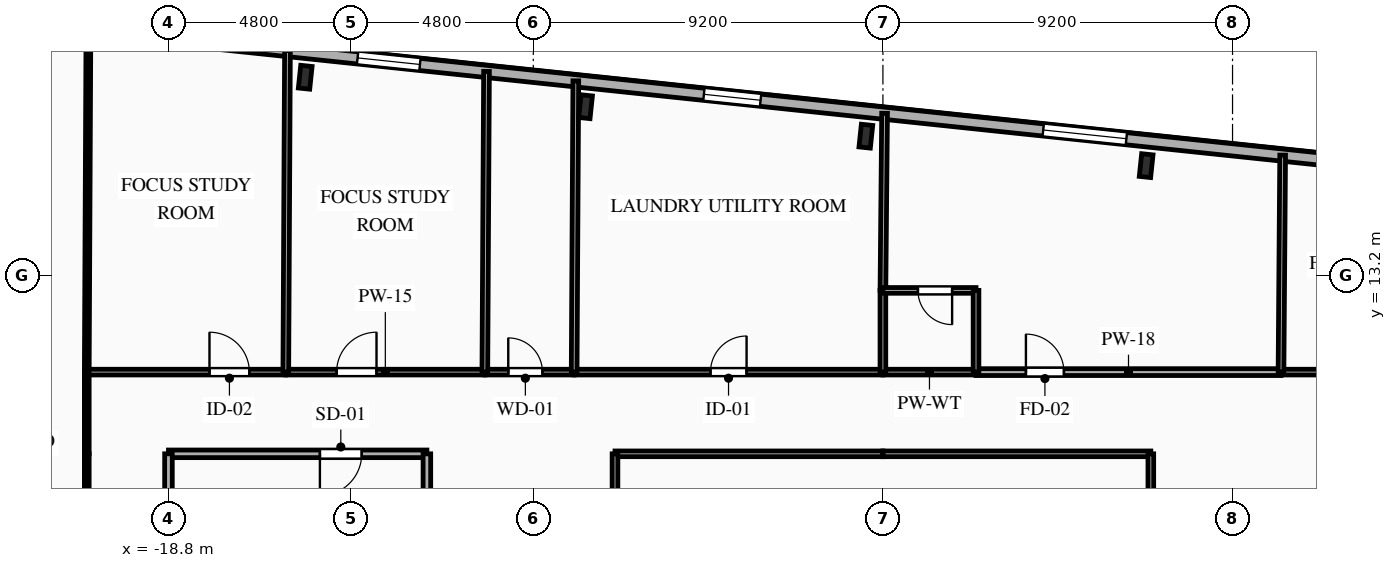
"""IFC4 building model, lengths in metres.
Left out: names, types, materials, properties, quantities, classifications, styles, units other than length and angle.
Written with IfcOpenShell. Run it as: python <this file> out.ifc"""

import sys

from ifc_helpers import new_model, si_unit, direction, frame, frame_2d, origin, origin_2d, place, context, subcontext, project, spatial, rectangle, i_section, extrude, element, fill, save


model = new_model("IFC4")
c1 = context("Model", 3, precision=1e-05, world=origin(), true_north=direction((0.0, 1.0)))
c2 = subcontext(c1, "Body", "Model", "MODEL_VIEW")
j1 = project(units=[si_unit("LENGTHUNIT", "METRE"), si_unit("PLANEANGLEUNIT", "RADIAN")], contexts=[c1])
p1 = place(None, origin())
s1 = spatial("IfcSite", under=j1, at=p1, CompositionType="ELEMENT")
p2 = place(p1, origin())
s2 = spatial("IfcBuilding", under=s1, at=p2, CompositionType="ELEMENT")
p3 = place(p2, frame((0.0, 0.0, 199.75)))
s3 = spatial("IfcBuildingStorey", under=s2, at=p3, CompositionType="ELEMENT", Elevation=199.75)
for number, where, z_axis, x_axis in (
    (1, (6.927, 16.083, 0.0), (0.0, 0.0, 1.0), (0.995, -0.105, 0.0)),
    (2, (-0.449, 16.858, 0.0), (0.0, 0.0, 1.0), (0.995, -0.105, 0.0)),
    (3, (-7.825, 17.634, 0.0), (0.0, 0.0, 1.0), (0.995, -0.105, 0.0)),
    (4, (-15.201, 18.409, 0.0), (0.0, 0.0, 1.0), (0.995, -0.105, 0.0)),
):
    element("IfcColumn", number, at=place(p3, frame(where, z_axis=z_axis, x_axis=x_axis)), inside=s3, PredefinedType="COLUMN", context=c2, shape_type="SweptSolid", body=[
        extrude(i_section(OverallWidth=0.3, OverallDepth=0.6, WebThickness=0.015, FlangeThickness=0.03, FilletRadius=0.027, at=origin_2d()), origin(), (0.0, 0.0, 1.0), 3.35),
    ])
p4 = place(p3, frame((-23.156, 19.898, 0.0), z_axis=(0.0, 0.0, 1.0), x_axis=(0.994522001802, -0.104527450613, 0.0)))
e5 = element("IfcWall", 5, at=p4, inside=s3, PredefinedType="SOLIDWALL", context=c2, shape_type="SweptSolid", body=[
    extrude(rectangle(XDim=45.8, YDim=0.32, at=frame_2d((22.9, 0.0))), origin(), (0.0, 0.0, 1.0), 3.04),
])
p5 = place(p4, frame((4.139, 0.0, 0.85)))
e6 = element("IfcOpeningElement", 6, at=p5, cuts=e5, PredefinedType="OPENING", context=c2, shape_type="SweptSolid", body=[
    extrude(rectangle(XDim=1.65, YDim=1.85, at=frame_2d((0.825, 0.925))), frame((0.0, 0.17, 0.0), z_axis=(0.0, -1.0, 0.0), x_axis=(1.0, 0.0, 0.0)), (0.0, 0.0, 1.0), 0.34),
])
p6 = place(p4, frame((9.384, 0.0, 0.85)))
e7 = element("IfcOpeningElement", 7, at=p6, cuts=e5, PredefinedType="OPENING", context=c2, shape_type="SweptSolid", body=[
    extrude(rectangle(XDim=1.65, YDim=1.85, at=frame_2d((0.825, 0.925))), frame((0.0, 0.17, 0.0), z_axis=(0.0, -1.0, 0.0), x_axis=(1.0, 0.0, 0.0)), (0.0, 0.0, 1.0), 0.34),
])
p7 = place(p4, frame((18.547, 0.0, 0.85)))
e8 = element("IfcOpeningElement", 8, at=p7, cuts=e5, PredefinedType="OPENING", context=c2, shape_type="SweptSolid", body=[
    extrude(rectangle(XDim=1.5, YDim=1.85, at=frame_2d((0.75, 0.925))), frame((0.0, 0.17, 0.0), z_axis=(0.0, -1.0, 0.0), x_axis=(1.0, 0.0, 0.0)), (0.0, 0.0, 1.0), 0.34),
])
p8 = place(p4, frame((27.525, 0.0, 0.85)))
e9 = element("IfcOpeningElement", 9, at=p8, cuts=e5, PredefinedType="OPENING", context=c2, shape_type="SweptSolid", body=[
    extrude(rectangle(XDim=2.2, YDim=1.85, at=frame_2d((1.1, 0.925))), frame((0.0, 0.17, 0.0), z_axis=(0.0, -1.0, 0.0), x_axis=(1.0, 0.0, 0.0)), (0.0, 0.0, 1.0), 0.34),
])
p9 = place(p4, frame((38.329, 0.0, 0.85)))
e10 = element("IfcOpeningElement", 10, at=p9, cuts=e5, PredefinedType="OPENING", context=c2, shape_type="SweptSolid", body=[
    extrude(rectangle(XDim=1.65, YDim=1.85, at=frame_2d((0.825, 0.925))), frame((0.0, 0.17, 0.0), z_axis=(0.0, -1.0, 0.0), x_axis=(1.0, 0.0, 0.0)), (0.0, 0.0, 1.0), 0.34),
])
p10 = place(p3, frame((-12.0, 8.5, 0.0), z_axis=(0.0, 0.0, 1.0), x_axis=(-1.0, 0.0, 0.0)))
e11 = element("IfcWall", 11, at=p10, inside=s3, PredefinedType="PARTITIONING", context=c2, shape_type="SweptSolid", body=[
    extrude(rectangle(XDim=6.8, YDim=0.2, at=frame_2d((3.4, 0.0))), origin(), (0.0, 0.0, 1.0), 3.04),
])
p11 = place(p10, frame((1.715, 0.0, 0.0)))
e12 = element("IfcOpeningElement", 12, at=p11, cuts=e11, PredefinedType="OPENING", context=c2, shape_type="SweptSolid", body=[
    extrude(rectangle(XDim=1.1, YDim=2.15, at=frame_2d((0.55, 1.075))), frame((0.0, 0.11, 0.0), z_axis=(0.0, -1.0, 0.0), x_axis=(1.0, 0.0, 0.0)), (0.0, 0.0, 1.0), 0.22),
])
p12 = place(p3, frame((-18.8, 8.5, 0.0), z_axis=(0.0, 0.0, 1.0), x_axis=(0.0, -1.0, 0.0)))
e13 = element("IfcWall", 13, at=p12, inside=s3, PredefinedType="PARTITIONING", context=c2, shape_type="SweptSolid", body=[
    extrude(rectangle(XDim=2.9, YDim=0.2, at=frame_2d((1.45, 0.0))), origin(), (0.0, 0.0, 1.0), 2.665),
])
p13 = place(p3, frame((-12.0, 5.6, 0.0), z_axis=(0.0, 0.0, 1.0), x_axis=(0.0, 1.0, 0.0)))
e14 = element("IfcWall", 14, at=p13, inside=s3, PredefinedType="PARTITIONING", context=c2, shape_type="SweptSolid", body=[
    extrude(rectangle(XDim=2.9, YDim=0.2, at=frame_2d((1.45, 0.0))), origin(), (0.0, 0.0, 1.0), 3.04),
])
p14 = place(p3, frame((-20.95, 8.5, 0.0), z_axis=(0.0, 0.0, 1.0), x_axis=(0.0, 1.0, 0.0)))
e15 = element("IfcWall", 15, at=p14, inside=s3, PredefinedType="PARTITIONING", context=c2, shape_type="SweptSolid", body=[
    extrude(rectangle(XDim=2.15, YDim=0.125, at=frame_2d((1.075, 0.0))), origin(), (0.0, 0.0, 1.0), 3.04),
])
p15 = place(p3, frame((-20.95, 10.65, 0.0), z_axis=(0.0, 0.0, 1.0), x_axis=(1.0, 0.0, 0.0)))
e16 = element("IfcWall", 16, at=p15, inside=s3, PredefinedType="PARTITIONING", context=c2, shape_type="SweptSolid", body=[
    extrude(rectangle(XDim=5.238, YDim=0.15, at=frame_2d((2.619, 0.0))), origin(), (0.0, 0.0, 1.0), 3.04),
])
p16 = place(p15, frame((3.229, 0.0, 0.0)))
e17 = element("IfcOpeningElement", 17, at=p16, cuts=e16, PredefinedType="OPENING", context=c2, shape_type="SweptSolid", body=[
    extrude(rectangle(XDim=1.05, YDim=2.15, at=frame_2d((0.525, 1.075))), frame((0.0, 0.085, 0.0), z_axis=(0.0, -1.0, 0.0), x_axis=(1.0, 0.0, 0.0)), (0.0, 0.0, 1.0), 0.17),
])
p17 = place(p3, frame((-15.712, 10.65, 0.0), z_axis=(0.0, 0.0, 1.0), x_axis=(1.0, 0.0, 0.0)))
e18 = element("IfcWall", 18, at=p17, inside=s3, PredefinedType="PARTITIONING", context=c2, shape_type="SweptSolid", body=[
    extrude(rectangle(XDim=5.237, YDim=0.15, at=frame_2d((2.619, 0.0))), origin(), (0.0, 0.0, 1.0), 3.04),
])
p18 = place(p17, frame((1.337, 0.0, 0.0)))
e19 = element("IfcOpeningElement", 19, at=p18, cuts=e18, PredefinedType="OPENING", context=c2, shape_type="SweptSolid", body=[
    extrude(rectangle(XDim=1.05, YDim=2.15, at=frame_2d((0.525, 1.075))), frame((0.0, 0.085, 0.0), z_axis=(0.0, -1.0, 0.0), x_axis=(1.0, 0.0, 0.0)), (0.0, 0.0, 1.0), 0.17),
])
p19 = place(p3, frame((-10.475, 10.65, 0.0), z_axis=(0.0, 0.0, 1.0), x_axis=(1.0, 0.0, 0.0)))
e20 = element("IfcWall", 20, at=p19, inside=s3, PredefinedType="PLUMBINGWALL", context=c2, shape_type="SweptSolid", body=[
    extrude(rectangle(XDim=2.35, YDim=0.15, at=frame_2d((1.175, 0.0))), origin(), (0.0, 0.0, 1.0), 3.04),
])
p20 = place(p19, frame((0.616, 0.0, 0.0)))
e21 = element("IfcOpeningElement", 21, at=p20, cuts=e20, PredefinedType="OPENING", context=c2, shape_type="SweptSolid", body=[
    extrude(rectangle(XDim=0.9, YDim=2.1, at=frame_2d((0.45, 1.05))), frame((0.0, 0.085, 0.0), z_axis=(0.0, -1.0, 0.0), x_axis=(1.0, 0.0, 0.0)), (0.0, 0.0, 1.0), 0.17),
])
p21 = place(p3, frame((-8.125, 10.65, 0.0), z_axis=(0.0, 0.0, 1.0), x_axis=(1.0, 0.0, 0.0)))
e22 = element("IfcWall", 22, at=p21, inside=s3, PredefinedType="PARTITIONING", context=c2, shape_type="SweptSolid", body=[
    extrude(rectangle(XDim=8.125, YDim=0.15, at=frame_2d((4.062, 0.0))), origin(), (0.0, 0.0, 1.0), 3.04),
])
p22 = place(p21, frame((3.587, 0.0, 0.0)))
e23 = element("IfcOpeningElement", 23, at=p22, cuts=e22, PredefinedType="OPENING", context=c2, shape_type="SweptSolid", body=[
    extrude(rectangle(XDim=0.95, YDim=2.1, at=frame_2d((0.475, 1.05))), frame((0.0, 0.085, 0.0), z_axis=(0.0, -1.0, 0.0), x_axis=(1.0, 0.0, 0.0)), (0.0, 0.0, 1.0), 0.17),
])
p23 = place(p3, frame((0.0, 8.5, 0.0), z_axis=(0.0, 0.0, 1.0), x_axis=(-1.0, 0.0, 0.0)))
e24 = element("IfcWall", 24, at=p23, inside=s3, PredefinedType="PARTITIONING", context=c2, shape_type="SweptSolid", body=[
    extrude(rectangle(XDim=7.05, YDim=0.15, at=frame_2d((3.525, 0.0))), origin(), (0.0, 0.0, 1.0), 3.04),
])
p24 = place(p3, frame((2.45, 10.65, 0.0), z_axis=(0.0, 0.0, 1.0), x_axis=(1.0, 0.0, 0.0)))
e25 = element("IfcWall", 25, at=p24, inside=s3, PredefinedType="PARTITIONING", context=c2, shape_type="SweptSolid", body=[
    extrude(rectangle(XDim=8.025, YDim=0.18, at=frame_2d((4.013, 0.0))), origin(), (0.0, 0.0, 1.0), 3.04),
])
p25 = place(p24, frame((1.313, 0.0, 0.0)))
e26 = element("IfcOpeningElement", 26, at=p25, cuts=e25, PredefinedType="OPENING", context=c2, shape_type="SweptSolid", body=[
    extrude(rectangle(XDim=1.0, YDim=2.15, at=frame_2d((0.5, 1.075))), frame((0.0, 0.1, 0.0), z_axis=(0.0, -1.0, 0.0), x_axis=(1.0, 0.0, 0.0)), (0.0, 0.0, 1.0), 0.2),
])
p26 = place(p3, frame((0.0, 10.65, 0.0), z_axis=(0.0, 0.0, 1.0), x_axis=(1.0, 0.0, 0.0)))
e27 = element("IfcWall", 27, at=p26, inside=s3, PredefinedType="PLUMBINGWALL", context=c2, shape_type="SweptSolid", body=[
    extrude(rectangle(XDim=2.45, YDim=0.15, at=frame_2d((1.225, 0.0))), origin(), (0.0, 0.0, 1.0), 3.04),
])
p27 = place(p3, frame((10.475, 10.65, 0.0), z_axis=(0.0, 0.0, 1.0), x_axis=(1.0, 0.0, 0.0)))
e28 = element("IfcWall", 28, at=p27, inside=s3, PredefinedType="PARTITIONING", context=c2, shape_type="SweptSolid", body=[
    extrude(rectangle(XDim=10.475, YDim=0.15, at=frame_2d((5.237, 0.0))), origin(), (0.0, 0.0, 1.0), 3.04),
])
p28 = place(p27, frame((5.746, 0.0, 0.0)))
e29 = element("IfcOpeningElement", 29, at=p28, cuts=e28, PredefinedType="OPENING", context=c2, shape_type="SweptSolid", body=[
    extrude(rectangle(XDim=1.05, YDim=2.15, at=frame_2d((0.525, 1.075))), frame((0.0, 0.085, 0.0), z_axis=(0.0, -1.0, 0.0), x_axis=(1.0, 0.0, 0.0)), (0.0, 0.0, 1.0), 0.17),
])
p29 = place(p3, frame((7.05, 8.5, 0.0), z_axis=(0.0, 0.0, 1.0), x_axis=(-1.0, 0.0, 0.0)))
e30 = element("IfcWall", 30, at=p29, inside=s3, PredefinedType="PARTITIONING", context=c2, shape_type="SweptSolid", body=[
    extrude(rectangle(XDim=7.05, YDim=0.15, at=frame_2d((3.525, 0.0))), origin(), (0.0, 0.0, 1.0), 3.04),
])
p30 = place(p3, frame((-20.95, 2.267, 0.0), z_axis=(0.0, 0.0, 1.0), x_axis=(0.0, 1.0, 0.0)))
e31 = element("IfcWall", 31, at=p30, inside=s3, PredefinedType="PARTITIONING", context=c2, shape_type="SweptSolid", body=[
    extrude(rectangle(XDim=6.233, YDim=0.125, at=frame_2d((3.116, 0.0))), origin(), (0.0, 0.0, 1.0), 3.04),
])
p31 = place(p30, frame((1.095, 0.0, 0.0)))
e32 = element("IfcOpeningElement", 32, at=p31, cuts=e31, PredefinedType="OPENING", context=c2, shape_type="SweptSolid", body=[
    extrude(rectangle(XDim=0.95, YDim=2.1, at=frame_2d((0.475, 1.05))), frame((0.0, 0.073, 0.0), z_axis=(0.0, -1.0, 0.0), x_axis=(1.0, 0.0, 0.0)), (0.0, 0.0, 1.0), 0.145),
])
for number, where, z_axis, x_axis in (
    (33, (-7.05, 8.5, 0.0), (0.0, 0.0, 1.0), (0.0, -1.0, 0.0)),
    (34, (7.05, -0.8, 0.0), (0.0, 0.0, 1.0), (0.0, 1.0, 0.0)),
):
    element("IfcWall", number, at=place(p3, frame(where, z_axis=z_axis, x_axis=x_axis)), inside=s3, PredefinedType="PARTITIONING", context=c2, shape_type="SweptSolid", body=[
        extrude(rectangle(XDim=9.3, YDim=0.15, at=frame_2d((4.65, 0.0))), origin(), (0.0, 0.0, 1.0), 3.04),
    ])
p32 = place(p3, frame((-20.906, 19.662, 0.0), z_axis=(0.0, 0.0, 1.0), x_axis=(-0.004876272857, -0.999988110911, 0.0)))
e35 = element("IfcWall", 35, at=p32, inside=s3, PredefinedType="PARTITIONING", context=c2, shape_type="SweptSolid", body=[
    extrude(rectangle(XDim=9.012, YDim=0.125, at=frame_2d((4.506, 0.0))), origin(), (0.0, 0.0, 1.0), 2.665),
])
p33 = place(p3, frame((-15.669, 19.112, 0.0), z_axis=(0.0, 0.0, 1.0), x_axis=(-0.005164534834, -0.999986663701, 0.0)))
e36 = element("IfcWall", 36, at=p33, inside=s3, PredefinedType="PARTITIONING", context=c2, shape_type="SweptSolid", body=[
    extrude(rectangle(XDim=8.462, YDim=0.15, at=frame_2d((4.231, 0.0))), origin(), (0.0, 0.0, 1.0), 2.665),
])
p34 = place(p3, frame((-10.431, 18.561, 0.0), z_axis=(0.0, 0.0, 1.0), x_axis=(-0.005554784069, -0.999984572068, 0.0)))
e37 = element("IfcWall", 37, at=p34, inside=s3, PredefinedType="PLUMBINGWALL", context=c2, shape_type="SweptSolid", body=[
    extrude(rectangle(XDim=7.911, YDim=0.15, at=frame_2d((3.956, 0.0))), origin(), (0.0, 0.0, 1.0), 3.04),
])
p35 = place(p3, frame((-8.081, 18.314, 0.0), z_axis=(0.0, 0.0, 1.0), x_axis=(-0.005733850696, -0.999983561343, 0.0)))
e38 = element("IfcWall", 38, at=p35, inside=s3, PredefinedType="PLUMBINGWALL", context=c2, shape_type="SweptSolid", body=[
    extrude(rectangle(XDim=7.664, YDim=0.15, at=frame_2d((3.832, 0.0))), origin(), (0.0, 0.0, 1.0), 2.665),
])
p36 = place(p3, frame((0.044, 17.46, 0.0), z_axis=(0.0, 0.0, 1.0), x_axis=(-0.009430083116, -0.999955535778, 0.0)))
e39 = element("IfcWall", 39, at=p36, inside=s3, PredefinedType="PARTITIONING", context=c2, shape_type="SweptSolid", body=[
    extrude(rectangle(XDim=4.66, YDim=0.15, at=frame_2d((2.33, 0.0))), origin(), (0.0, 0.0, 1.0), 3.04),
])
p37 = place(p3, frame((0.0, 12.8, 0.0), z_axis=(0.0, 0.0, 1.0), x_axis=(0.0, -1.0, 0.0)))
e40 = element("IfcWall", 40, at=p37, inside=s3, PredefinedType="PLUMBINGWALL", context=c2, shape_type="SweptSolid", body=[
    extrude(rectangle(XDim=2.15, YDim=0.15, at=frame_2d((1.075, 0.0))), origin(), (0.0, 0.0, 1.0), 3.04),
])
p38 = place(p3, frame((2.45, 12.8, 0.0), z_axis=(0.0, 0.0, 1.0), x_axis=(-1.0, 0.0, 0.0)))
e41 = element("IfcWall", 41, at=p38, inside=s3, PredefinedType="PLUMBINGWALL", context=c2, shape_type="SweptSolid", body=[
    extrude(rectangle(XDim=2.45, YDim=0.15, at=frame_2d((1.225, 0.0))), origin(), (0.0, 0.0, 1.0), 3.04),
])
p39 = place(p38, frame((0.629, 0.0, 0.0)))
e42 = element("IfcOpeningElement", 42, at=p39, cuts=e41, PredefinedType="OPENING", context=c2, shape_type="SweptSolid", body=[
    extrude(rectangle(XDim=0.9, YDim=2.1, at=frame_2d((0.45, 1.05))), frame((0.0, 0.085, 0.0), z_axis=(0.0, -1.0, 0.0), x_axis=(1.0, 0.0, 0.0)), (0.0, 0.0, 1.0), 0.17),
])
p40 = place(p3, frame((2.45, 10.65, 0.0), z_axis=(0.0, 0.0, 1.0), x_axis=(0.0, 1.0, 0.0)))
e43 = element("IfcWall", 43, at=p40, inside=s3, PredefinedType="PLUMBINGWALL", context=c2, shape_type="SweptSolid", body=[
    extrude(rectangle(XDim=2.15, YDim=0.15, at=frame_2d((1.075, 0.0))), origin(), (0.0, 0.0, 1.0), 3.04),
])
p41 = place(p3, frame((10.519, 16.359, 0.0), z_axis=(0.0, 0.0, 1.0), x_axis=(-0.007654255135, -0.99997070576, 0.0)))
e44 = element("IfcWall", 44, at=p41, inside=s3, PredefinedType="PARTITIONING", context=c2, shape_type="SweptSolid", body=[
    extrude(rectangle(XDim=5.709, YDim=0.15, at=frame_2d((2.855, 0.0))), origin(), (0.0, 0.0, 1.0), 3.04),
])
p42 = place(p6, origin())
e45 = element("IfcWindow", 45, at=p42, inside=s3, PartitioningType="SINGLE_PANEL", PredefinedType="WINDOW", context=c2, shape_type="SweptSolid", body=[
    extrude(rectangle(XDim=1.65, YDim=1.85, at=frame_2d((0.825, 0.925))), frame((0.0, 0.03, 0.0), z_axis=(0.0, -1.0, 0.0), x_axis=(1.0, 0.0, 0.0)), (0.0, 0.0, 1.0), 0.06),
])
fill(e7, e45)
p43 = place(p7, origin())
e46 = element("IfcWindow", 46, at=p43, inside=s3, PartitioningType="SINGLE_PANEL", PredefinedType="WINDOW", context=c2, shape_type="SweptSolid", body=[
    extrude(rectangle(XDim=1.5, YDim=1.85, at=frame_2d((0.75, 0.925))), frame((0.0, 0.03, 0.0), z_axis=(0.0, -1.0, 0.0), x_axis=(1.0, 0.0, 0.0)), (0.0, 0.0, 1.0), 0.06),
])
fill(e8, e46)
p44 = place(p8, origin())
e47 = element("IfcWindow", 47, at=p44, inside=s3, PartitioningType="SINGLE_PANEL", PredefinedType="WINDOW", context=c2, shape_type="SweptSolid", body=[
    extrude(rectangle(XDim=2.2, YDim=1.85, at=frame_2d((1.1, 0.925))), frame((0.0, 0.03, 0.0), z_axis=(0.0, -1.0, 0.0), x_axis=(1.0, 0.0, 0.0)), (0.0, 0.0, 1.0), 0.06),
])
fill(e9, e47)
p45 = place(p11, origin())
e48 = element("IfcDoor", 48, at=p45, inside=s3, OperationType="SINGLE_SWING_RIGHT", PredefinedType="DOOR", context=c2, shape_type="SweptSolid", body=[
    extrude(rectangle(XDim=1.1, YDim=2.15, at=frame_2d((0.55, 1.075))), frame((0.0, 0.025, 0.0), z_axis=(0.0, -1.0, 0.0), x_axis=(1.0, 0.0, 0.0)), (0.0, 0.0, 1.0), 0.05),
])
fill(e12, e48)
p46 = place(p16, origin())
e49 = element("IfcDoor", 49, at=p46, inside=s3, OperationType="SINGLE_SWING_LEFT", PredefinedType="DOOR", context=c2, shape_type="SweptSolid", body=[
    extrude(rectangle(XDim=1.05, YDim=2.15, at=frame_2d((0.525, 1.075))), frame((0.0, 0.025, 0.0), z_axis=(0.0, -1.0, 0.0), x_axis=(1.0, 0.0, 0.0)), (0.0, 0.0, 1.0), 0.05),
])
fill(e17, e49)
p47 = place(p18, origin())
e50 = element("IfcDoor", 50, at=p47, inside=s3, OperationType="SINGLE_SWING_RIGHT", PredefinedType="DOOR", context=c2, shape_type="SweptSolid", body=[
    extrude(rectangle(XDim=1.05, YDim=2.15, at=frame_2d((0.525, 1.075))), frame((0.0, 0.025, 0.0), z_axis=(0.0, -1.0, 0.0), x_axis=(1.0, 0.0, 0.0)), (0.0, 0.0, 1.0), 0.05),
])
fill(e19, e50)
p48 = place(p20, origin())
e51 = element("IfcDoor", 51, at=p48, inside=s3, OperationType="SINGLE_SWING_LEFT", PredefinedType="DOOR", context=c2, shape_type="SweptSolid", body=[
    extrude(rectangle(XDim=0.9, YDim=2.1, at=frame_2d((0.45, 1.05))), frame((0.0, 0.025, 0.0), z_axis=(0.0, -1.0, 0.0), x_axis=(1.0, 0.0, 0.0)), (0.0, 0.0, 1.0), 0.05),
])
fill(e21, e51)
p49 = place(p22, origin())
e52 = element("IfcDoor", 52, at=p49, inside=s3, OperationType="SINGLE_SWING_RIGHT", PredefinedType="DOOR", context=c2, shape_type="SweptSolid", body=[
    extrude(rectangle(XDim=0.95, YDim=2.1, at=frame_2d((0.475, 1.05))), frame((0.0, 0.025, 0.0), z_axis=(0.0, -1.0, 0.0), x_axis=(1.0, 0.0, 0.0)), (0.0, 0.0, 1.0), 0.05),
])
fill(e23, e52)
p50 = place(p25, origin())
e53 = element("IfcDoor", 53, at=p50, inside=s3, OperationType="SINGLE_SWING_LEFT", PredefinedType="DOOR", context=c2, shape_type="SweptSolid", body=[
    extrude(rectangle(XDim=1.0, YDim=2.15, at=frame_2d((0.5, 1.075))), frame((0.0, 0.025, 0.0), z_axis=(0.0, -1.0, 0.0), x_axis=(1.0, 0.0, 0.0)), (0.0, 0.0, 1.0), 0.05),
])
fill(e26, e53)
p51 = place(p39, origin())
e54 = element("IfcDoor", 54, at=p51, inside=s3, OperationType="SINGLE_SWING_LEFT", PredefinedType="DOOR", context=c2, shape_type="SweptSolid", body=[
    extrude(rectangle(XDim=0.9, YDim=2.1, at=frame_2d((0.45, 1.05))), frame((0.0, 0.025, 0.0), z_axis=(0.0, -1.0, 0.0), x_axis=(1.0, 0.0, 0.0)), (0.0, 0.0, 1.0), 0.05),
])
fill(e42, e54)
save(model, sys.argv[1])
